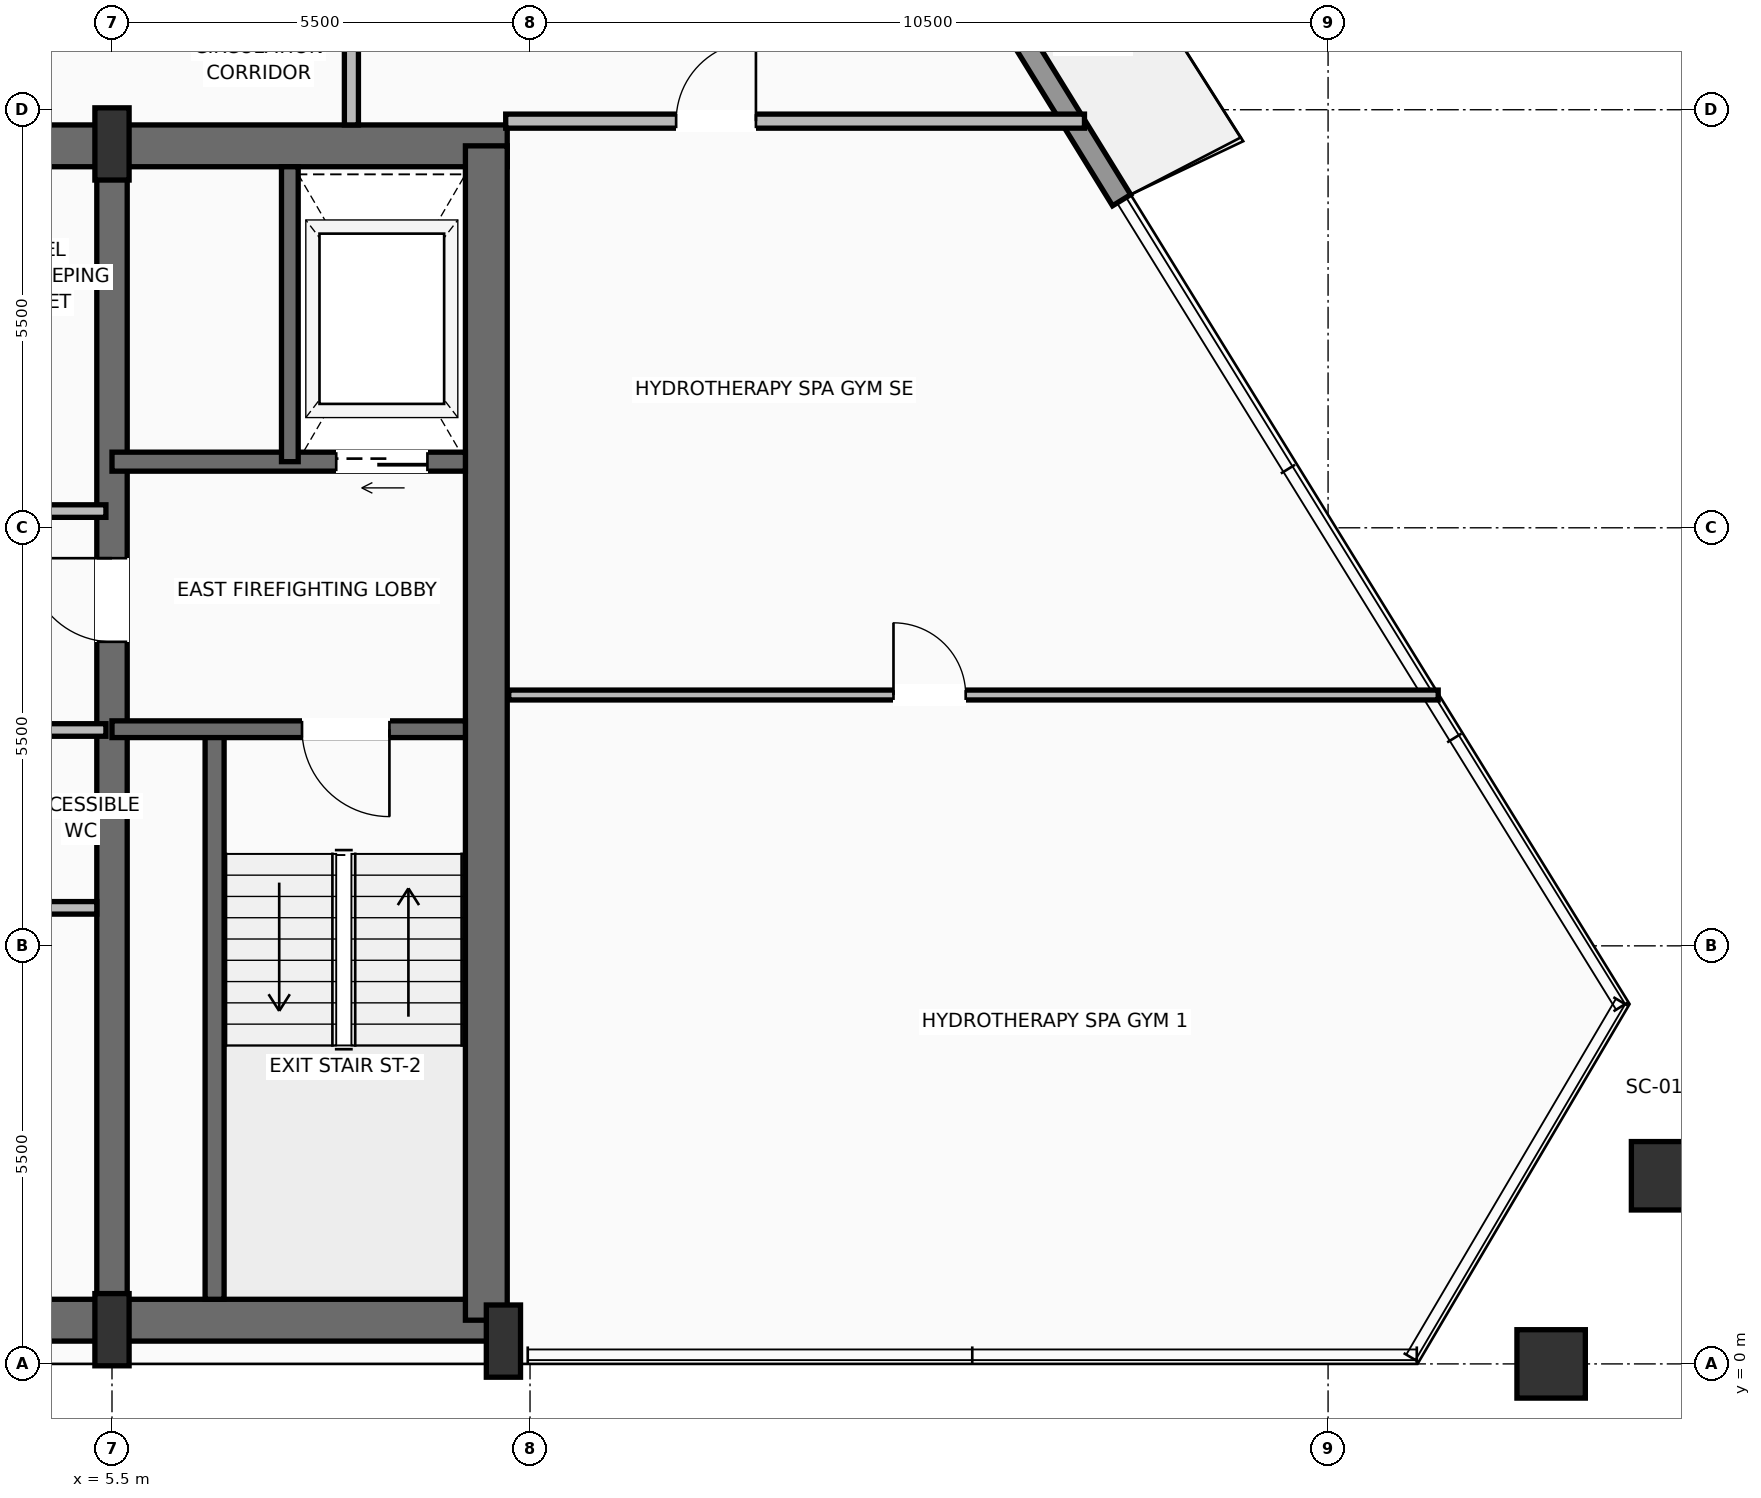
"""IFC4 building model, lengths in metres.
Left out: names, types, materials, properties, quantities, classifications, styles, units other than length and angle.
Written with IfcOpenShell. Run it as: python <this file> out.ifc"""

import sys

from ifc_helpers import new_model, si_unit, direction, frame, frame_2d, origin, origin_2d, place, context, subcontext, project, spatial, rectangle, hollow_rectangle, extrude, source, transform, mapped, element, fill, save


model = new_model("IFC4")
c1 = context("Model", 3, precision=1e-05, world=origin(), true_north=direction((0.0, 1.0)))
c2 = subcontext(c1, "Body", "Model", "MODEL_VIEW")
j1 = project(units=[si_unit("LENGTHUNIT", "METRE"), si_unit("PLANEANGLEUNIT", "RADIAN")], contexts=[c1])
p1 = place(None, origin())
s1 = spatial("IfcSite", under=j1, at=p1, CompositionType="ELEMENT")
p2 = place(p1, origin())
s2 = spatial("IfcBuilding", under=s1, at=p2, CompositionType="ELEMENT")
p3 = place(p2, frame((0.0, 0.0, 240.7)))
s3 = spatial("IfcBuildingStorey", under=s2, at=p3, CompositionType="ELEMENT", Elevation=240.7)
p4 = place(p3, frame((-10.65, 0.575, 0.0), z_axis=(0.0, 0.0, 1.0), x_axis=(1.0, 0.0, 0.0)))
e1 = element("IfcWall", 1, at=p4, inside=s3, PredefinedType="SHEAR", context=c2, shape_type="SweptSolid", body=[
    extrude(rectangle(XDim=21.3, YDim=0.55, at=frame_2d((10.65, 0.0))), origin(), (0.0, 0.0, 1.0), 3.24),
])
p5 = place(p3, frame((-10.7, 16.025, 0.0), z_axis=(0.0, 0.0, 1.0), x_axis=(1.0, 0.0, 0.0)))
e2 = element("IfcWall", 2, at=p5, inside=s3, PredefinedType="SHEAR", context=c2, shape_type="SweptSolid", body=[
    extrude(rectangle(XDim=21.4, YDim=0.55, at=frame_2d((10.7, 0.0))), origin(), (0.0, 0.0, 1.0), 3.24),
])
p6 = place(p5, frame((3.27, 0.0, 0.0)))
e3 = element("IfcOpeningElement", 3, at=p6, cuts=e2, PredefinedType="OPENING", context=c2, shape_type="SweptSolid", body=[
    extrude(rectangle(XDim=1.3, YDim=2.3, at=frame_2d((0.65, 1.15))), frame((0.0, 0.285, 0.0), z_axis=(0.0, -1.0, 0.0), x_axis=(1.0, 0.0, 0.0)), (0.0, 0.0, 1.0), 0.57),
])
p7 = place(p5, frame((9.7, 0.0, 0.0)))
e4 = element("IfcOpeningElement", 4, at=p7, cuts=e2, PredefinedType="OPENING", context=c2, shape_type="SweptSolid", body=[
    extrude(rectangle(XDim=2.0, YDim=2.4, at=frame_2d((1.0, 1.2))), frame((0.0, 0.285, 0.0), z_axis=(0.0, -1.0, 0.0), x_axis=(1.0, 0.0, 0.0)), (0.0, 0.0, 1.0), 0.57),
])
p8 = place(p3, frame((10.425, 0.575, 0.0), z_axis=(0.0, 0.0, 1.0), x_axis=(0.0, 1.0, 0.0)))
e5 = element("IfcWall", 5, at=p8, inside=s3, PredefinedType="SHEAR", context=c2, shape_type="SweptSolid", body=[
    extrude(rectangle(XDim=15.45, YDim=0.55, at=frame_2d((7.725, 0.0))), origin(), (0.0, 0.0, 1.0), 3.24),
])
p9 = place(p3, frame((5.5, 0.575, 0.0), z_axis=(0.0, 0.0, 1.0), x_axis=(0.0, 1.0, 0.0)))
e6 = element("IfcWall", 6, at=p9, inside=s3, PredefinedType="SHEAR", context=c2, shape_type="SweptSolid", body=[
    extrude(rectangle(XDim=15.45, YDim=0.4, at=frame_2d((7.725, 0.0))), origin(), (0.0, 0.0, 1.0), 3.24),
])
p10 = place(p9, frame((8.925, 0.0, 0.0)))
e7 = element("IfcOpeningElement", 7, at=p10, cuts=e6, PredefinedType="OPENING", context=c2, shape_type="SweptSolid", body=[
    extrude(rectangle(XDim=1.1, YDim=2.2, at=frame_2d((0.55, 1.1))), frame((0.0, 0.21, 0.0), z_axis=(0.0, -1.0, 0.0), x_axis=(1.0, 0.0, 0.0)), (0.0, 0.0, 1.0), 0.42),
])
m1 = source(origin(), c2, "Body", "SweptSolid", [
    extrude(rectangle(XDim=0.45, YDim=0.95, at=origin_2d()), origin(), (0.0, 0.0, 1.0), 3.45),
])
for number, where, z_axis, x_axis in (
    (8, (5.5, 0.45, 0.0), (0.0, 0.0, 1.0), (1.0, 0.0, 0.0)),
    (9, (10.65, 0.3, 0.0), (0.0, 0.0, 1.0), (1.0, 0.0, 0.0)),
    (10, (5.5, 16.05, 0.0), (0.0, 0.0, 1.0), (1.0, 0.0, 0.0)),
):
    element("IfcColumn", number, at=place(p3, frame(where, z_axis=z_axis, x_axis=x_axis)), inside=s3, PredefinedType="PILASTER", context=c2, shape_type="MappedRepresentation", body=[
        mapped(m1, transform((0.0, 0.0, 0.0), scale=1.0)),
    ])
m2 = source(origin(), c2, "Body", "SweptSolid", [
    extrude(hollow_rectangle(XDim=0.9, YDim=0.9, WallThickness=0.045, at=origin_2d()), origin(), (0.0, 0.0, 1.0), 3.441),
])
p11 = place(p3, frame((24.435, 0.0, 0.004), z_axis=(0.000993259531, 0.0, 0.999999506718), x_axis=(1.0, 0.0, 0.0)))
e11 = element("IfcColumn", 11, at=p11, inside=s3, PredefinedType="COLUMN", context=c2, shape_type="MappedRepresentation", body=[
    mapped(m2, transform((0.0, 0.0, 0.0), scale=1.0)),
])
m3 = source(origin(), c2, "Body", "SweptSolid", [
    extrude(hollow_rectangle(XDim=0.9, YDim=0.9, WallThickness=0.045, at=origin_2d()), origin(), (0.0, 0.0, 1.0), 3.442),
])
p12 = place(p3, frame((25.94, 2.475, 0.004), z_axis=(-0.009930776846, -0.016385781796, 0.999816426063), x_axis=(0.855197831554, -0.518301716093, 0.0)))
e12 = element("IfcColumn", 12, at=p12, inside=s3, PredefinedType="COLUMN", context=c2, shape_type="MappedRepresentation", body=[
    mapped(m3, transform((0.0, 0.0, 0.0), scale=1.0)),
])
p13 = place(p3, frame((8.468, 32.044, 0.0), z_axis=(0.0, 0.0, 1.0), x_axis=(0.524731986951, -0.851267491374, 0.0)))
e13 = element("IfcWall", 13, at=p13, inside=s3, PredefinedType="SOLIDWALL", context=c2, shape_type="SweptSolid", body=[
    extrude(rectangle(XDim=19.658, YDim=0.28, at=frame_2d((9.829, 0.0))), origin(), (0.0, 0.0, 1.0), 2.82),
])
p14 = place(p13, frame((4.718, 0.0, 0.0)))
e14 = element("IfcOpeningElement", 14, at=p14, cuts=e13, PredefinedType="OPENING", context=c2, shape_type="SweptSolid", body=[
    extrude(rectangle(XDim=1.6, YDim=2.35, at=frame_2d((0.8, 1.175))), frame((0.0, 0.15, 0.0), z_axis=(0.0, -1.0, 0.0), x_axis=(1.0, 0.0, 0.0)), (0.0, 0.0, 1.0), 0.3),
])
p15 = place(p13, frame((13.368, 0.0, 0.9)))
e15 = element("IfcOpeningElement", 15, at=p15, cuts=e13, PredefinedType="OPENING", context=c2, shape_type="SweptSolid", body=[
    extrude(rectangle(XDim=2.0, YDim=1.75, at=frame_2d((1.0, 0.875))), frame((0.0, 0.15, 0.0), z_axis=(0.0, -1.0, 0.0), x_axis=(1.0, 0.0, 0.0)), (0.0, 0.0, 1.0), 0.3),
])
p16 = place(p3, frame((6.85, 0.85, 0.0), z_axis=(0.0, 0.0, 1.0), x_axis=(0.0, 1.0, 0.0)))
e16 = element("IfcWall", 16, at=p16, inside=s3, PredefinedType="SOLIDWALL", context=c2, shape_type="SweptSolid", body=[
    extrude(rectangle(XDim=7.5, YDim=0.25, at=frame_2d((3.75, 0.0))), origin(), (0.0, 0.0, 1.0), 3.24),
])
p17 = place(p3, frame((10.15, 8.35, 0.0), z_axis=(0.0, 0.0, 1.0), x_axis=(-1.0, 0.0, 0.0)))
e17 = element("IfcWall", 17, at=p17, inside=s3, PredefinedType="SOLIDWALL", context=c2, shape_type="SweptSolid", body=[
    extrude(rectangle(XDim=4.65, YDim=0.22, at=frame_2d((2.325, 0.0))), origin(), (0.0, 0.0, 1.0), 3.24),
])
p18 = place(p17, frame((1.0, 0.0, 0.0)))
e18 = element("IfcOpeningElement", 18, at=p18, cuts=e17, PredefinedType="OPENING", context=c2, shape_type="SweptSolid", body=[
    extrude(rectangle(XDim=1.15, YDim=2.2, at=frame_2d((0.575, 1.1))), frame((0.0, 0.12, 0.0), z_axis=(0.0, -1.0, 0.0), x_axis=(1.0, 0.0, 0.0)), (0.0, 0.0, 1.0), 0.24),
])
p19 = place(p3, frame((10.15, 11.87, 0.0), z_axis=(0.0, 0.0, 1.0), x_axis=(-1.0, 0.0, 0.0)))
e19 = element("IfcWall", 19, at=p19, inside=s3, PredefinedType="SOLIDWALL", context=c2, shape_type="SweptSolid", body=[
    extrude(rectangle(XDim=4.65, YDim=0.25, at=frame_2d((2.325, 0.0))), origin(), (0.0, 0.0, 1.0), 3.24),
])
p20 = place(p19, frame((0.5, 0.0, 0.0)))
e20 = element("IfcOpeningElement", 20, at=p20, cuts=e19, PredefinedType="OPENING", context=c2, shape_type="SweptSolid", body=[
    extrude(rectangle(XDim=1.2, YDim=2.25, at=frame_2d((0.6, 1.125))), frame((0.0, 0.135, 0.0), z_axis=(0.0, -1.0, 0.0), x_axis=(1.0, 0.0, 0.0)), (0.0, 0.0, 1.0), 0.27),
])
p21 = place(p3, frame((7.84, 11.87, 0.0), z_axis=(0.0, 0.0, 1.0), x_axis=(0.0, 1.0, 0.0)))
e21 = element("IfcWall", 21, at=p21, inside=s3, PredefinedType="SOLIDWALL", context=c2, shape_type="SweptSolid", body=[
    extrude(rectangle(XDim=3.88, YDim=0.22, at=frame_2d((1.94, 0.0))), origin(), (0.0, 0.0, 1.0), 3.24),
])
p22 = place(p3, frame((-5.5, 6.0, 0.0), z_axis=(0.0, 0.0, 1.0), x_axis=(1.0, 0.0, 0.0)))
e22 = element("IfcWall", 22, at=p22, inside=s3, PredefinedType="PARTITIONING", context=c2, shape_type="SweptSolid", body=[
    extrude(rectangle(XDim=10.8, YDim=0.165, at=frame_2d((5.4, 0.0))), origin(), (0.0, 0.0, 1.0), 3.232),
])
p23 = place(p22, frame((7.7, 0.0, 0.0)))
e23 = element("IfcOpeningElement", 23, at=p23, cuts=e22, PredefinedType="OPENING", context=c2, shape_type="SweptSolid", body=[
    extrude(rectangle(XDim=0.9, YDim=2.1, at=frame_2d((0.45, 1.05))), frame((0.0, 0.093, 0.0), z_axis=(0.0, -1.0, 0.0), x_axis=(1.0, 0.0, 0.0)), (0.0, 0.0, 1.0), 0.185),
])
for number, where, z_axis, x_axis in (
    (24, (3.54, 8.34, 0.0), (0.0, 0.0, 1.0), (1.0, 0.0, 0.0)),
    (25, (3.54, 11.22, 0.0), (0.0, 0.0, 1.0), (1.0, 0.0, 0.0)),
):
    element("IfcWall", number, at=place(p3, frame(where, z_axis=z_axis, x_axis=x_axis)), inside=s3, PredefinedType="PARTITIONING", context=c2, shape_type="SweptSolid", body=[
        extrude(rectangle(XDim=1.88, YDim=0.165, at=frame_2d((0.94, 0.0))), origin(), (0.0, 0.0, 1.0), 3.232),
    ])
p24 = place(p3, frame((8.65, 16.3, 0.0), z_axis=(0.0, 0.0, 1.0), x_axis=(0.0, 1.0, 0.0)))
e26 = element("IfcWall", 26, at=p24, inside=s3, PredefinedType="PARTITIONING", context=c2, shape_type="SweptSolid", body=[
    extrude(rectangle(XDim=13.9, YDim=0.185, at=frame_2d((6.95, 0.0))), origin(), (0.0, 0.0, 1.0), 3.232),
])
p25 = place(p24, frame((3.144, 0.0, 0.0)))
e27 = element("IfcOpeningElement", 27, at=p25, cuts=e26, PredefinedType="OPENING", context=c2, shape_type="SweptSolid", body=[
    extrude(rectangle(XDim=1.05, YDim=2.25, at=frame_2d((0.525, 1.125))), frame((0.0, 0.103, 0.0), z_axis=(0.0, -1.0, 0.0), x_axis=(1.0, 0.0, 0.0)), (0.0, 0.0, 1.0), 0.205),
])
p26 = place(p3, frame((10.68, 16.35, 0.0), z_axis=(0.0, 0.0, 1.0), x_axis=(1.0, 0.0, 0.0)))
e28 = element("IfcWall", 28, at=p26, inside=s3, PredefinedType="PARTITIONING", context=c2, shape_type="SweptSolid", body=[
    extrude(rectangle(XDim=7.615, YDim=0.185, at=frame_2d((3.808, 0.0))), origin(), (0.0, 0.0, 1.0), 3.232),
])
p27 = place(p26, frame((2.242, 0.0, 0.0)))
e29 = element("IfcOpeningElement", 29, at=p27, cuts=e28, PredefinedType="OPENING", context=c2, shape_type="SweptSolid", body=[
    extrude(rectangle(XDim=1.05, YDim=2.25, at=frame_2d((0.525, 1.125))), frame((0.0, 0.103, 0.0), z_axis=(0.0, -1.0, 0.0), x_axis=(1.0, 0.0, 0.0)), (0.0, 0.0, 1.0), 0.205),
])
p28 = place(p3, frame((10.72, 8.8, 0.0), z_axis=(0.0, 0.0, 1.0), x_axis=(1.0, 0.0, 0.0)))
e30 = element("IfcWall", 30, at=p28, inside=s3, PredefinedType="PARTITIONING", context=c2, shape_type="SweptSolid", body=[
    extrude(rectangle(XDim=12.229, YDim=0.13, at=frame_2d((6.115, 0.0))), origin(), (0.0, 0.0, 1.0), 3.232),
])
p29 = place(p28, frame((5.062, 0.0, 0.0)))
e31 = element("IfcOpeningElement", 31, at=p29, cuts=e30, PredefinedType="OPENING", context=c2, shape_type="SweptSolid", body=[
    extrude(rectangle(XDim=0.95, YDim=2.2, at=frame_2d((0.475, 1.1))), frame((0.0, 0.075, 0.0), z_axis=(0.0, -1.0, 0.0), x_axis=(1.0, 0.0, 0.0)), (0.0, 0.0, 1.0), 0.15),
])
m4 = source(origin(), c2, "Body", "SweptSolid", [
    extrude(rectangle(XDim=1.15, YDim=2.2, at=frame_2d((0.575, 1.1))), frame((0.0, 0.025, 0.0), z_axis=(0.0, -1.0, 0.0), x_axis=(1.0, 0.0, 0.0)), (0.0, 0.0, 1.0), 0.05),
])
p30 = place(p18, origin())
e32 = element("IfcDoor", 32, at=p30, inside=s3, OperationType="SINGLE_SWING_LEFT", PredefinedType="DOOR", context=c2, shape_type="MappedRepresentation", body=[
    mapped(m4, transform((0.0, 0.0, 0.0), scale=1.0)),
])
fill(e18, e32)
m5 = source(origin(), c2, "Body", "SweptSolid", [
    extrude(rectangle(XDim=1.1, YDim=2.2, at=frame_2d((0.55, 1.1))), frame((0.0, 0.025, 0.0), z_axis=(0.0, -1.0, 0.0), x_axis=(1.0, 0.0, 0.0)), (0.0, 0.0, 1.0), 0.05),
])
p31 = place(p10, origin())
e33 = element("IfcDoor", 33, at=p31, inside=s3, OperationType="SINGLE_SWING_RIGHT", PredefinedType="DOOR", context=c2, shape_type="MappedRepresentation", body=[
    mapped(m5, transform((0.0, 0.0, 0.0), scale=1.0)),
])
fill(e7, e33)
m6 = source(origin(), c2, "Body", "SweptSolid", [
    extrude(rectangle(XDim=1.2, YDim=2.25, at=frame_2d((0.6, 1.125))), frame((0.0, 0.025, 0.0), z_axis=(0.0, -1.0, 0.0), x_axis=(1.0, 0.0, 0.0)), (0.0, 0.0, 1.0), 0.05),
])
p32 = place(p20, origin())
e34 = element("IfcDoor", 34, at=p32, inside=s3, OperationType="SLIDING_TO_RIGHT", PredefinedType="DOOR", context=c2, shape_type="MappedRepresentation", body=[
    mapped(m6, transform((0.0, 0.0, 0.0), scale=1.0)),
])
fill(e20, e34)
m7 = source(origin(), c2, "Body", "SweptSolid", [
    extrude(rectangle(XDim=1.05, YDim=2.25, at=frame_2d((0.525, 1.125))), frame((0.0, 0.025, 0.0), z_axis=(0.0, -1.0, 0.0), x_axis=(1.0, 0.0, 0.0)), (0.0, 0.0, 1.0), 0.05),
])
p33 = place(p27, origin())
e35 = element("IfcDoor", 35, at=p33, inside=s3, OperationType="SINGLE_SWING_RIGHT", PredefinedType="DOOR", context=c2, shape_type="MappedRepresentation", body=[
    mapped(m7, transform((0.0, 0.0, 0.0), scale=1.0)),
])
fill(e29, e35)
m8 = source(origin(), c2, "Body", "SweptSolid", [
    extrude(rectangle(XDim=0.95, YDim=2.2, at=frame_2d((0.475, 1.1))), frame((0.0, 0.025, 0.0), z_axis=(0.0, -1.0, 0.0), x_axis=(1.0, 0.0, 0.0)), (0.0, 0.0, 1.0), 0.05),
])
p34 = place(p29, origin())
e36 = element("IfcDoor", 36, at=p34, inside=s3, OperationType="SINGLE_SWING_LEFT", PredefinedType="DOOR", context=c2, shape_type="MappedRepresentation", body=[
    mapped(m8, transform((0.0, 0.0, 0.0), scale=1.0)),
])
fill(e31, e36)
save(model, sys.argv[1])
